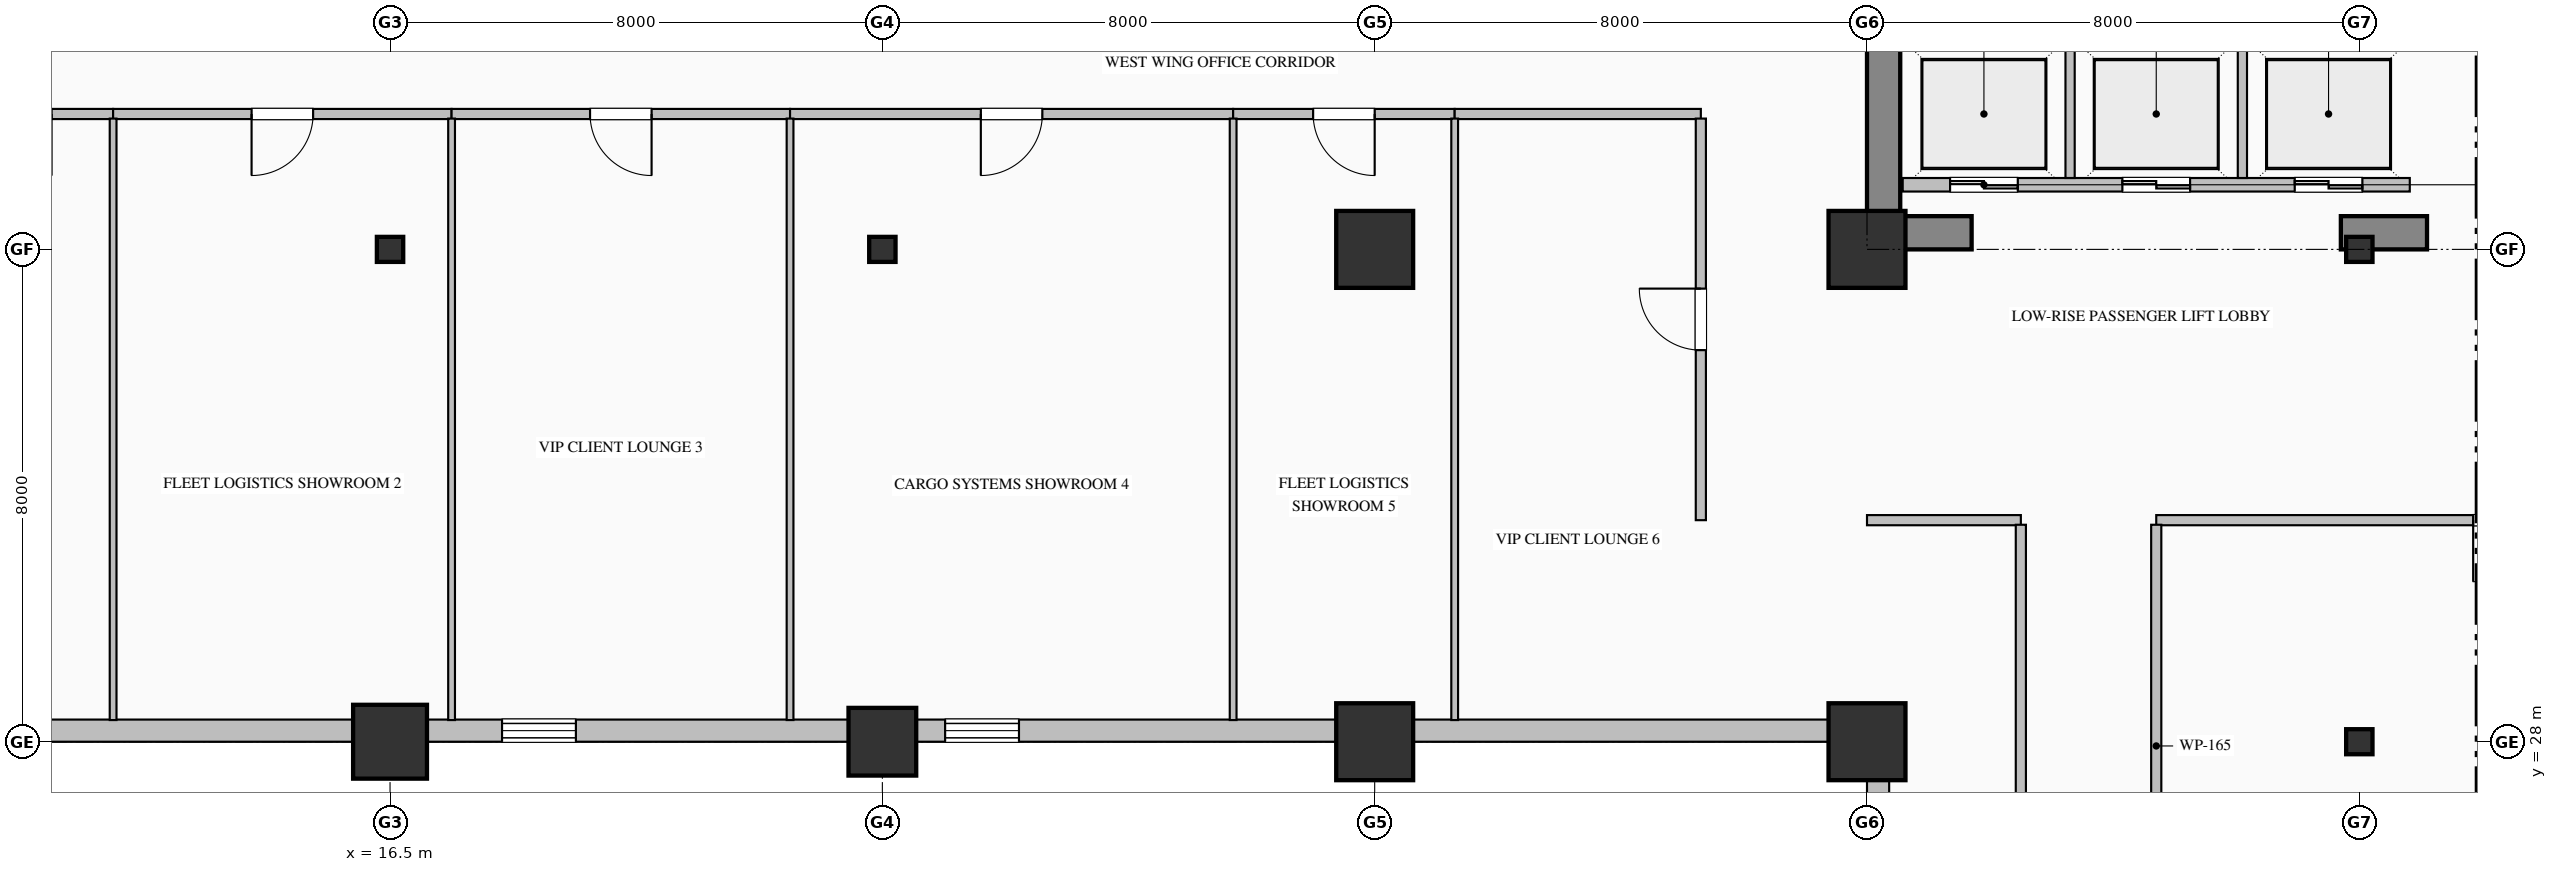
"""IFC4 building model, lengths in metres.
Left out: names, types, materials, properties, quantities, classifications, styles, units other than length and angle.
Written with IfcOpenShell. Run it as: python <this file> out.ifc"""

import sys

from ifc_helpers import new_model, si_unit, direction, frame, frame_2d, origin, origin_2d, place, context, subcontext, project, spatial, rectangle, hollow_rectangle, hollow_circle, i_section, extrude, element, fill, save


model = new_model("IFC4")
c1 = context("Model", 3, precision=1e-05, world=origin(), true_north=direction((0.0, 1.0)))
c2 = subcontext(c1, "Body", "Model", "MODEL_VIEW")
j1 = project(units=[si_unit("LENGTHUNIT", "METRE"), si_unit("PLANEANGLEUNIT", "RADIAN")], contexts=[c1])
p1 = place(None, origin())
s1 = spatial("IfcSite", under=j1, at=p1, CompositionType="ELEMENT")
p2 = place(p1, origin())
s2 = spatial("IfcBuilding", under=s1, at=p2, CompositionType="ELEMENT")
p3 = place(p2, frame((0.0, 0.0, 96.2)))
s3 = spatial("IfcBuildingStorey", under=s2, at=p3, CompositionType="ELEMENT", Elevation=96.2)
p4 = place(p3, frame((40.77, 36.54, 0.0), z_axis=(0.0, 0.0, 1.0), x_axis=(0.0, 1.0, 0.0)))
e1 = element("IfcWall", 1, at=p4, inside=s3, PredefinedType="SHEAR", context=c2, shape_type="SweptSolid", body=[
    extrude(rectangle(XDim=7.86, YDim=0.54, at=frame_2d((3.93, 0.0))), origin(), (0.0, 0.0, 1.0), 3.75),
])
p5 = place(p3, frame((40.5, 36.27, 0.0), z_axis=(0.0, 0.0, 1.0), x_axis=(1.0, 0.0, 0.0)))
e2 = element("IfcWall", 2, at=p5, inside=s3, PredefinedType="SHEAR", context=c2, shape_type="SweptSolid", body=[
    extrude(rectangle(XDim=1.7, YDim=0.54, at=frame_2d((0.85, 0.0))), origin(), (0.0, 0.0, 1.0), 3.75),
])
p6 = place(p3, frame((48.2, 36.27, 0.0), z_axis=(0.0, 0.0, 1.0), x_axis=(1.0, 0.0, 0.0)))
e3 = element("IfcWall", 3, at=p6, inside=s3, PredefinedType="SHEAR", context=c2, shape_type="SweptSolid", body=[
    extrude(rectangle(XDim=1.4, YDim=0.54, at=frame_2d((0.7, 0.0))), origin(), (0.0, 0.0, 1.0), 3.75),
])
p7 = place(p3, frame((16.5, 28.0, 0.0), z_axis=(0.0, 0.0, 1.0), x_axis=(1.0, 0.0, 0.0)))
e4 = element("IfcColumn", 4, at=p7, inside=s3, PredefinedType="COLUMN", context=c2, shape_type="SweptSolid", body=[
    extrude(hollow_circle(Radius=0.6, WallThickness=0.04, at=origin_2d()), origin(), (0.0, 0.0, 1.0), 4.0),
])
p8 = place(p3, frame((16.5, 36.0, 0.0), z_axis=(0.0, 0.0, 1.0), x_axis=(1.0, 0.0, 0.0)))
e5 = element("IfcColumn", 5, at=p8, inside=s3, PredefinedType="COLUMN", context=c2, shape_type="SweptSolid", body=[
    extrude(i_section(OverallWidth=0.407, OverallDepth=0.428, WebThickness=0.02, FlangeThickness=0.035, FilletRadius=0.022, at=origin_2d()), origin(), (0.0, 0.0, 1.0), 4.0),
])
p9 = place(p3, frame((24.5, 28.0, 0.0), z_axis=(0.0, 0.0, 1.0), x_axis=(1.0, 0.0, 0.0)))
e6 = element("IfcColumn", 6, at=p9, inside=s3, PredefinedType="COLUMN", context=c2, shape_type="SweptSolid", body=[
    extrude(hollow_rectangle(XDim=1.1, YDim=1.1, WallThickness=0.04, at=origin_2d()), origin(), (0.0, 0.0, 1.0), 4.0),
])
p10 = place(p3, frame((24.5, 36.0, 0.0), z_axis=(0.0, 0.0, 1.0), x_axis=(1.0, 0.0, 0.0)))
e7 = element("IfcColumn", 7, at=p10, inside=s3, PredefinedType="COLUMN", context=c2, shape_type="SweptSolid", body=[
    extrude(i_section(OverallWidth=0.407, OverallDepth=0.428, WebThickness=0.02, FlangeThickness=0.035, FilletRadius=0.022, at=origin_2d()), origin(), (0.0, 0.0, 1.0), 4.0),
])
for number, where, z_axis, x_axis in (
    (8, (32.5, 28.0, 0.0), (0.0, 0.0, 1.0), (1.0, 0.0, 0.0)),
    (9, (32.5, 36.0, 0.0), (0.0, 0.0, 1.0), (1.0, 0.0, 0.0)),
    (10, (40.5, 28.0, 0.0), (0.0, 0.0, 1.0), (1.0, 0.0, 0.0)),
    (11, (40.5, 36.0, 0.0), (0.0, 0.0, 1.0), (1.0, 0.0, 0.0)),
):
    element("IfcColumn", number, at=place(p3, frame(where, z_axis=z_axis, x_axis=x_axis)), inside=s3, PredefinedType="COLUMN", context=c2, shape_type="SweptSolid", body=[
        extrude(hollow_rectangle(XDim=1.25, YDim=1.25, WallThickness=0.045, at=origin_2d()), origin(), (0.0, 0.0, 1.0), 4.0),
    ])
for number, where, z_axis, x_axis in (
    (12, (48.5, 28.0, 0.0), (0.0, 0.0, 1.0), (1.0, 0.0, 0.0)),
    (13, (48.5, 36.0, 0.0), (0.0, 0.0, 1.0), (1.0, 0.0, 0.0)),
):
    element("IfcColumn", number, at=place(p3, frame(where, z_axis=z_axis, x_axis=x_axis)), inside=s3, PredefinedType="COLUMN", context=c2, shape_type="SweptSolid", body=[
        extrude(i_section(OverallWidth=0.407, OverallDepth=0.428, WebThickness=0.02, FlangeThickness=0.035, FilletRadius=0.022, at=origin_2d()), origin(), (0.0, 0.0, 1.0), 4.0),
    ])
p11 = place(p3, frame((40.68, 8.0, 0.0), z_axis=(0.0, 0.0, 1.0), x_axis=(0.0, 1.0, 0.0)))
e14 = element("IfcWall", 14, at=p11, inside=s3, PredefinedType="SOLIDWALL", context=c2, shape_type="SweptSolid", body=[
    extrude(rectangle(XDim=20.36, YDim=0.36, at=frame_2d((10.18, 0.0))), origin(), (0.0, 0.0, 1.0), 3.05),
])
p12 = place(p11, frame((6.6, 0.0, 0.7)))
e15 = element("IfcOpeningElement", 15, at=p12, cuts=e14, PredefinedType="OPENING", context=c2, shape_type="SweptSolid", body=[
    extrude(rectangle(XDim=1.2, YDim=1.85, at=frame_2d((0.6, 0.925))), frame((0.0, 0.19, 0.0), z_axis=(0.0, -1.0, 0.0), x_axis=(1.0, 0.0, 0.0)), (0.0, 0.0, 1.0), 0.38),
])
p13 = place(p11, frame((13.8, 0.0, 0.7)))
e16 = element("IfcOpeningElement", 16, at=p13, cuts=e14, PredefinedType="OPENING", context=c2, shape_type="SweptSolid", body=[
    extrude(rectangle(XDim=1.2, YDim=1.85, at=frame_2d((0.6, 0.925))), frame((0.0, 0.19, 0.0), z_axis=(0.0, -1.0, 0.0), x_axis=(1.0, 0.0, 0.0)), (0.0, 0.0, 1.0), 0.38),
])
p14 = place(p3, frame((40.52, 28.18, 0.0), z_axis=(0.0, 0.0, 1.0), x_axis=(-1.0, 0.0, 0.0)))
e17 = element("IfcWall", 17, at=p14, inside=s3, PredefinedType="SOLIDWALL", context=c2, shape_type="SweptSolid", body=[
    extrude(rectangle(XDim=36.52, YDim=0.36, at=frame_2d((18.26, 0.0))), origin(), (0.0, 0.0, 1.0), 3.05),
])
p15 = place(p14, frame((13.8, 0.0, 0.7)))
e18 = element("IfcOpeningElement", 18, at=p15, cuts=e17, PredefinedType="OPENING", context=c2, shape_type="SweptSolid", body=[
    extrude(rectangle(XDim=1.2, YDim=1.85, at=frame_2d((0.6, 0.925))), frame((0.0, 0.19, 0.0), z_axis=(0.0, -1.0, 0.0), x_axis=(1.0, 0.0, 0.0)), (0.0, 0.0, 1.0), 0.38),
])
p16 = place(p14, frame((21.0, 0.0, 0.7)))
e19 = element("IfcOpeningElement", 19, at=p16, cuts=e17, PredefinedType="OPENING", context=c2, shape_type="SweptSolid", body=[
    extrude(rectangle(XDim=1.2, YDim=1.85, at=frame_2d((0.6, 0.925))), frame((0.0, 0.19, 0.0), z_axis=(0.0, -1.0, 0.0), x_axis=(1.0, 0.0, 0.0)), (0.0, 0.0, 1.0), 0.38),
])
p17 = place(p3, frame((49.32, 37.05, 0.0), z_axis=(0.0, 0.0, 1.0), x_axis=(-1.0, 0.0, 0.0)))
e20 = element("IfcWall", 20, at=p17, inside=s3, PredefinedType="PARTITIONING", context=c2, shape_type="SweptSolid", body=[
    extrude(rectangle(XDim=8.24, YDim=0.22, at=frame_2d((4.12, 0.0))), origin(), (0.0, 0.0, 1.0), 3.75),
])
p18 = place(p17, frame((6.37, 0.0, 0.0)))
e21 = element("IfcOpeningElement", 21, at=p18, cuts=e20, PredefinedType="OPENING", context=c2, shape_type="SweptSolid", body=[
    extrude(rectangle(XDim=1.1, YDim=2.2, at=frame_2d((0.55, 1.1))), frame((0.0, 0.12, 0.0), z_axis=(0.0, -1.0, 0.0), x_axis=(1.0, 0.0, 0.0)), (0.0, 0.0, 1.0), 0.24),
])
p19 = place(p17, frame((3.57, 0.0, 0.0)))
e22 = element("IfcOpeningElement", 22, at=p19, cuts=e20, PredefinedType="OPENING", context=c2, shape_type="SweptSolid", body=[
    extrude(rectangle(XDim=1.1, YDim=2.2, at=frame_2d((0.55, 1.1))), frame((0.0, 0.12, 0.0), z_axis=(0.0, -1.0, 0.0), x_axis=(1.0, 0.0, 0.0)), (0.0, 0.0, 1.0), 0.24),
])
p20 = place(p17, frame((0.77, 0.0, 0.0)))
e23 = element("IfcOpeningElement", 23, at=p20, cuts=e20, PredefinedType="OPENING", context=c2, shape_type="SweptSolid", body=[
    extrude(rectangle(XDim=1.1, YDim=2.2, at=frame_2d((0.55, 1.1))), frame((0.0, 0.12, 0.0), z_axis=(0.0, -1.0, 0.0), x_axis=(1.0, 0.0, 0.0)), (0.0, 0.0, 1.0), 0.24),
])
for number, where, z_axis, x_axis in (
    (24, (43.8, 37.16, 0.0), (0.0, 0.0, 1.0), (0.0, 1.0, 0.0)),
    (25, (46.6, 37.16, 0.0), (0.0, 0.0, 1.0), (0.0, 1.0, 0.0)),
):
    element("IfcWall", number, at=place(p3, frame(where, z_axis=z_axis, x_axis=x_axis)), inside=s3, PredefinedType="PARTITIONING", context=c2, shape_type="SweptSolid", body=[
        extrude(rectangle(XDim=2.08, YDim=0.15, at=frame_2d((1.04, 0.0))), origin(), (0.0, 0.0, 1.0), 3.75),
    ])
p21 = place(p3, frame((12.0, 38.2, 0.0), z_axis=(0.0, 0.0, 1.0), x_axis=(-1.0, 0.0, 0.0)))
e26 = element("IfcWall", 26, at=p21, inside=s3, PredefinedType="PARTITIONING", context=c2, shape_type="SweptSolid", body=[
    extrude(rectangle(XDim=3.0, YDim=0.165, at=frame_2d((1.5, 0.0))), origin(), (0.0, 0.0, 1.0), 3.75),
])
p22 = place(p21, frame((1.0, 0.0, 0.0)))
e27 = element("IfcOpeningElement", 27, at=p22, cuts=e26, PredefinedType="OPENING", context=c2, shape_type="SweptSolid", body=[
    extrude(rectangle(XDim=1.0, YDim=2.15, at=frame_2d((0.5, 1.075))), frame((0.0, 0.093, 0.0), z_axis=(0.0, -1.0, 0.0), x_axis=(1.0, 0.0, 0.0)), (0.0, 0.0, 1.0), 0.185),
])
p23 = place(p3, frame((17.5, 38.2, 0.0), z_axis=(0.0, 0.0, 1.0), x_axis=(-1.0, 0.0, 0.0)))
e28 = element("IfcWall", 28, at=p23, inside=s3, PredefinedType="PARTITIONING", context=c2, shape_type="SweptSolid", body=[
    extrude(rectangle(XDim=5.5, YDim=0.165, at=frame_2d((2.75, 0.0))), origin(), (0.0, 0.0, 1.0), 3.75),
])
p24 = place(p23, frame((2.25, 0.0, 0.0)))
e29 = element("IfcOpeningElement", 29, at=p24, cuts=e28, PredefinedType="OPENING", context=c2, shape_type="SweptSolid", body=[
    extrude(rectangle(XDim=1.0, YDim=2.15, at=frame_2d((0.5, 1.075))), frame((0.0, 0.093, 0.0), z_axis=(0.0, -1.0, 0.0), x_axis=(1.0, 0.0, 0.0)), (0.0, 0.0, 1.0), 0.185),
])
p25 = place(p3, frame((23.0, 38.2, 0.0), z_axis=(0.0, 0.0, 1.0), x_axis=(-1.0, 0.0, 0.0)))
e30 = element("IfcWall", 30, at=p25, inside=s3, PredefinedType="PARTITIONING", context=c2, shape_type="SweptSolid", body=[
    extrude(rectangle(XDim=5.5, YDim=0.165, at=frame_2d((2.75, 0.0))), origin(), (0.0, 0.0, 1.0), 3.75),
])
p26 = place(p25, frame((2.25, 0.0, 0.0)))
e31 = element("IfcOpeningElement", 31, at=p26, cuts=e30, PredefinedType="OPENING", context=c2, shape_type="SweptSolid", body=[
    extrude(rectangle(XDim=1.0, YDim=2.15, at=frame_2d((0.5, 1.075))), frame((0.0, 0.093, 0.0), z_axis=(0.0, -1.0, 0.0), x_axis=(1.0, 0.0, 0.0)), (0.0, 0.0, 1.0), 0.185),
])
p27 = place(p3, frame((30.2, 38.2, 0.0), z_axis=(0.0, 0.0, 1.0), x_axis=(-1.0, 0.0, 0.0)))
e32 = element("IfcWall", 32, at=p27, inside=s3, PredefinedType="PARTITIONING", context=c2, shape_type="SweptSolid", body=[
    extrude(rectangle(XDim=7.2, YDim=0.165, at=frame_2d((3.6, 0.0))), origin(), (0.0, 0.0, 1.0), 3.75),
])
p28 = place(p27, frame((3.1, 0.0, 0.0)))
e33 = element("IfcOpeningElement", 33, at=p28, cuts=e32, PredefinedType="OPENING", context=c2, shape_type="SweptSolid", body=[
    extrude(rectangle(XDim=1.0, YDim=2.15, at=frame_2d((0.5, 1.075))), frame((0.0, 0.093, 0.0), z_axis=(0.0, -1.0, 0.0), x_axis=(1.0, 0.0, 0.0)), (0.0, 0.0, 1.0), 0.185),
])
p29 = place(p3, frame((33.8, 38.2, 0.0), z_axis=(0.0, 0.0, 1.0), x_axis=(-1.0, 0.0, 0.0)))
e34 = element("IfcWall", 34, at=p29, inside=s3, PredefinedType="PARTITIONING", context=c2, shape_type="SweptSolid", body=[
    extrude(rectangle(XDim=3.6, YDim=0.165, at=frame_2d((1.8, 0.0))), origin(), (0.0, 0.0, 1.0), 3.75),
])
p30 = place(p29, frame((1.3, 0.0, 0.0)))
e35 = element("IfcOpeningElement", 35, at=p30, cuts=e34, PredefinedType="OPENING", context=c2, shape_type="SweptSolid", body=[
    extrude(rectangle(XDim=1.0, YDim=2.15, at=frame_2d((0.5, 1.075))), frame((0.0, 0.093, 0.0), z_axis=(0.0, -1.0, 0.0), x_axis=(1.0, 0.0, 0.0)), (0.0, 0.0, 1.0), 0.185),
])
p31 = place(p3, frame((37.8, 38.2, 0.0), z_axis=(0.0, 0.0, 1.0), x_axis=(-1.0, 0.0, 0.0)))
e36 = element("IfcWall", 36, at=p31, inside=s3, PredefinedType="PARTITIONING", context=c2, shape_type="SweptSolid", body=[
    extrude(rectangle(XDim=4.0, YDim=0.165, at=frame_2d((2.0, 0.0))), origin(), (0.0, 0.0, 1.0), 3.75),
])
p32 = place(p3, frame((37.8, 31.6, 0.0), z_axis=(0.0, 0.0, 1.0), x_axis=(0.0, 1.0, 0.0)))
e37 = element("IfcWall", 37, at=p32, inside=s3, PredefinedType="PARTITIONING", context=c2, shape_type="SweptSolid", body=[
    extrude(rectangle(XDim=6.525, YDim=0.165, at=frame_2d((3.263, 0.0))), origin(), (0.0, 0.0, 1.0), 3.75),
])
p33 = place(p32, frame((2.763, 0.0, 0.0)))
e38 = element("IfcOpeningElement", 38, at=p33, cuts=e37, PredefinedType="OPENING", context=c2, shape_type="SweptSolid", body=[
    extrude(rectangle(XDim=1.0, YDim=2.15, at=frame_2d((0.5, 1.075))), frame((0.0, 0.093, 0.0), z_axis=(0.0, -1.0, 0.0), x_axis=(1.0, 0.0, 0.0)), (0.0, 0.0, 1.0), 0.185),
])
p34 = place(p3, frame((56.5, 31.6, 0.0), z_axis=(0.0, 0.0, 1.0), x_axis=(-1.0, 0.0, 0.0)))
e39 = element("IfcWall", 39, at=p34, inside=s3, PredefinedType="PARTITIONING", context=c2, shape_type="SweptSolid", body=[
    extrude(rectangle(XDim=11.3, YDim=0.165, at=frame_2d((5.65, 0.0))), origin(), (0.0, 0.0, 1.0), 3.75),
])
p35 = place(p34, frame((5.15, 0.0, 0.0)))
e40 = element("IfcOpeningElement", 40, at=p35, cuts=e39, PredefinedType="OPENING", context=c2, shape_type="SweptSolid", body=[
    extrude(rectangle(XDim=1.0, YDim=2.15, at=frame_2d((0.5, 1.075))), frame((0.0, 0.093, 0.0), z_axis=(0.0, -1.0, 0.0), x_axis=(1.0, 0.0, 0.0)), (0.0, 0.0, 1.0), 0.185),
])
p36 = place(p3, frame((43.0, 31.6, 0.0), z_axis=(0.0, 0.0, 1.0), x_axis=(-1.0, 0.0, 0.0)))
e41 = element("IfcWall", 41, at=p36, inside=s3, PredefinedType="PARTITIONING", context=c2, shape_type="SweptSolid", body=[
    extrude(rectangle(XDim=2.5, YDim=0.165, at=frame_2d((1.25, 0.0))), origin(), (0.0, 0.0, 1.0), 3.75),
])
p37 = place(p3, frame((45.2, 31.525, 0.0), z_axis=(0.0, 0.0, 1.0), x_axis=(0.0, -1.0, 0.0)))
e42 = element("IfcWall", 42, at=p37, inside=s3, PredefinedType="PARTITIONING", context=c2, shape_type="SweptSolid", body=[
    extrude(rectangle(XDim=7.188, YDim=0.165, at=frame_2d((3.594, 0.0))), origin(), (0.0, 0.0, 1.0), 3.75),
])
p38 = place(p3, frame((43.0, 20.057, 0.0), z_axis=(0.0, 0.0, 1.0), x_axis=(0.0, 1.0, 0.0)))
e43 = element("IfcWall", 43, at=p38, inside=s3, PredefinedType="PARTITIONING", context=c2, shape_type="SweptSolid", body=[
    extrude(rectangle(XDim=11.469, YDim=0.165, at=frame_2d((5.734, 0.0))), origin(), (0.0, 0.0, 1.0), 3.75),
])
p39 = place(p38, frame((5.234, 0.0, 0.0)))
e44 = element("IfcOpeningElement", 44, at=p39, cuts=e43, PredefinedType="OPENING", context=c2, shape_type="SweptSolid", body=[
    extrude(rectangle(XDim=1.0, YDim=2.15, at=frame_2d((0.5, 1.075))), frame((0.0, 0.093, 0.0), z_axis=(0.0, -1.0, 0.0), x_axis=(1.0, 0.0, 0.0)), (0.0, 0.0, 1.0), 0.185),
])
for number, where, z_axis, x_axis in (
    (45, (12.0, 38.125, 0.0), (0.0, 0.0, 1.0), (0.0, -1.0, 0.0)),
    (46, (17.5, 38.125, 0.0), (0.0, 0.0, 1.0), (0.0, -1.0, 0.0)),
    (47, (23.0, 38.125, 0.0), (0.0, 0.0, 1.0), (0.0, -1.0, 0.0)),
    (48, (30.2, 38.125, 0.0), (0.0, 0.0, 1.0), (0.0, -1.0, 0.0)),
    (49, (33.8, 38.125, 0.0), (0.0, 0.0, 1.0), (0.0, -1.0, 0.0)),
):
    element("IfcWall", number, at=place(p3, frame(where, z_axis=z_axis, x_axis=x_axis)), inside=s3, PredefinedType="MOVABLE", context=c2, shape_type="SweptSolid", body=[
        extrude(rectangle(XDim=9.773, YDim=0.11, at=frame_2d((4.887, 0.0))), origin(), (0.0, 0.0, 1.0), 3.75),
    ])
p40 = place(p15, origin())
e50 = element("IfcWindow", 50, at=p40, inside=s3, PartitioningType="DOUBLE_PANEL_VERTICAL", PredefinedType="WINDOW", context=c2, shape_type="SweptSolid", body=[
    extrude(rectangle(XDim=1.2, YDim=1.85, at=frame_2d((0.6, 0.925))), frame((0.0, 0.15, 0.0), z_axis=(0.0, -1.0, 0.0), x_axis=(1.0, 0.0, 0.0)), (0.0, 0.0, 1.0), 0.06),
])
fill(e18, e50)
p41 = place(p16, origin())
e51 = element("IfcWindow", 51, at=p41, inside=s3, PartitioningType="DOUBLE_PANEL_VERTICAL", PredefinedType="WINDOW", context=c2, shape_type="SweptSolid", body=[
    extrude(rectangle(XDim=1.2, YDim=1.85, at=frame_2d((0.6, 0.925))), frame((0.0, 0.15, 0.0), z_axis=(0.0, -1.0, 0.0), x_axis=(1.0, 0.0, 0.0)), (0.0, 0.0, 1.0), 0.06),
])
fill(e19, e51)
p42 = place(p18, origin())
e52 = element("IfcDoor", 52, at=p42, inside=s3, OperationType="DOUBLE_DOOR_SLIDING", PredefinedType="DOOR", context=c2, shape_type="SweptSolid", body=[
    extrude(rectangle(XDim=1.1, YDim=2.2, at=frame_2d((0.55, 1.1))), frame((0.0, 0.025, 0.0), z_axis=(0.0, -1.0, 0.0), x_axis=(1.0, 0.0, 0.0)), (0.0, 0.0, 1.0), 0.05),
])
fill(e21, e52)
p43 = place(p19, origin())
e53 = element("IfcDoor", 53, at=p43, inside=s3, OperationType="DOUBLE_DOOR_SLIDING", PredefinedType="DOOR", context=c2, shape_type="SweptSolid", body=[
    extrude(rectangle(XDim=1.1, YDim=2.2, at=frame_2d((0.55, 1.1))), frame((0.0, 0.025, 0.0), z_axis=(0.0, -1.0, 0.0), x_axis=(1.0, 0.0, 0.0)), (0.0, 0.0, 1.0), 0.05),
])
fill(e22, e53)
p44 = place(p20, origin())
e54 = element("IfcDoor", 54, at=p44, inside=s3, OperationType="DOUBLE_DOOR_SLIDING", PredefinedType="DOOR", context=c2, shape_type="SweptSolid", body=[
    extrude(rectangle(XDim=1.1, YDim=2.2, at=frame_2d((0.55, 1.1))), frame((0.0, 0.025, 0.0), z_axis=(0.0, -1.0, 0.0), x_axis=(1.0, 0.0, 0.0)), (0.0, 0.0, 1.0), 0.05),
])
fill(e23, e54)
p45 = place(p35, origin())
e55 = element("IfcDoor", 55, at=p45, inside=s3, OperationType="SINGLE_SWING_RIGHT", PredefinedType="DOOR", context=c2, shape_type="SweptSolid", body=[
    extrude(rectangle(XDim=1.0, YDim=2.15, at=frame_2d((0.5, 1.075))), frame((0.0, 0.025, 0.0), z_axis=(0.0, -1.0, 0.0), x_axis=(1.0, 0.0, 0.0)), (0.0, 0.0, 1.0), 0.05),
])
fill(e40, e55)
p46 = place(p24, origin())
e56 = element("IfcDoor", 56, at=p46, inside=s3, OperationType="SINGLE_SWING_RIGHT", PredefinedType="DOOR", context=c2, shape_type="SweptSolid", body=[
    extrude(rectangle(XDim=1.0, YDim=2.15, at=frame_2d((0.5, 1.075))), frame((0.0, 0.025, 0.0), z_axis=(0.0, -1.0, 0.0), x_axis=(1.0, 0.0, 0.0)), (0.0, 0.0, 1.0), 0.05),
])
fill(e29, e56)
p47 = place(p26, origin())
e57 = element("IfcDoor", 57, at=p47, inside=s3, OperationType="SINGLE_SWING_LEFT", PredefinedType="DOOR", context=c2, shape_type="SweptSolid", body=[
    extrude(rectangle(XDim=1.0, YDim=2.15, at=frame_2d((0.5, 1.075))), frame((0.0, 0.025, 0.0), z_axis=(0.0, -1.0, 0.0), x_axis=(1.0, 0.0, 0.0)), (0.0, 0.0, 1.0), 0.05),
])
fill(e31, e57)
p48 = place(p28, origin())
e58 = element("IfcDoor", 58, at=p48, inside=s3, OperationType="SINGLE_SWING_RIGHT", PredefinedType="DOOR", context=c2, shape_type="SweptSolid", body=[
    extrude(rectangle(XDim=1.0, YDim=2.15, at=frame_2d((0.5, 1.075))), frame((0.0, 0.025, 0.0), z_axis=(0.0, -1.0, 0.0), x_axis=(1.0, 0.0, 0.0)), (0.0, 0.0, 1.0), 0.05),
])
fill(e33, e58)
p49 = place(p30, origin())
e59 = element("IfcDoor", 59, at=p49, inside=s3, OperationType="SINGLE_SWING_LEFT", PredefinedType="DOOR", context=c2, shape_type="SweptSolid", body=[
    extrude(rectangle(XDim=1.0, YDim=2.15, at=frame_2d((0.5, 1.075))), frame((0.0, 0.025, 0.0), z_axis=(0.0, -1.0, 0.0), x_axis=(1.0, 0.0, 0.0)), (0.0, 0.0, 1.0), 0.05),
])
fill(e35, e59)
p50 = place(p33, origin())
e60 = element("IfcDoor", 60, at=p50, inside=s3, OperationType="SINGLE_SWING_RIGHT", PredefinedType="DOOR", context=c2, shape_type="SweptSolid", body=[
    extrude(rectangle(XDim=1.0, YDim=2.15, at=frame_2d((0.5, 1.075))), frame((0.0, 0.025, 0.0), z_axis=(0.0, -1.0, 0.0), x_axis=(1.0, 0.0, 0.0)), (0.0, 0.0, 1.0), 0.05),
])
fill(e38, e60)
save(model, sys.argv[1])
